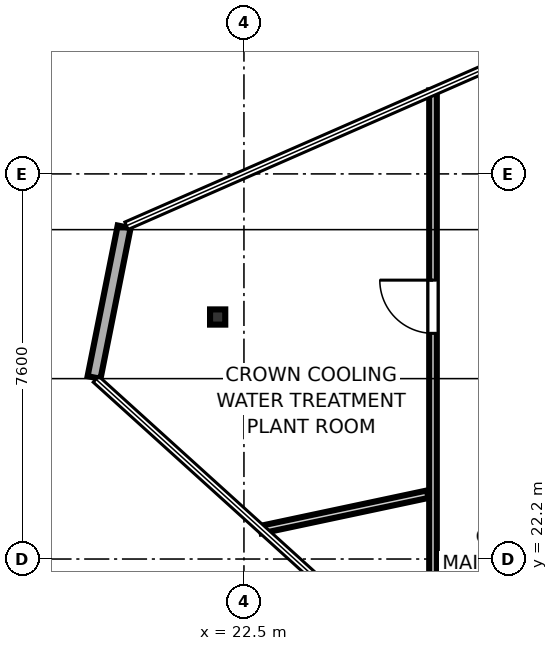
"""IFC4 building model, lengths in metres.
Left out: names, types, materials, properties, quantities, classifications, styles, units other than length and angle.
Written with IfcOpenShell. Run it as: python <this file> out.ifc"""

import sys

from ifc_helpers import new_model, si_unit, direction, frame, frame_2d, origin, origin_2d, place, context, subcontext, project, spatial, rectangle, i_section, extrude, element, fill, save


model = new_model("IFC4")
c1 = context("Model", 3, precision=1e-05, world=origin(), true_north=direction((0.0, 1.0)))
c2 = subcontext(c1, "Body", "Model", "MODEL_VIEW")
j1 = project(units=[si_unit("LENGTHUNIT", "METRE"), si_unit("PLANEANGLEUNIT", "RADIAN")], contexts=[c1])
p1 = place(None, origin())
s1 = spatial("IfcSite", under=j1, at=p1, CompositionType="ELEMENT")
p2 = place(p1, origin())
s2 = spatial("IfcBuilding", under=s1, at=p2, CompositionType="ELEMENT")
p3 = place(p2, frame((0.0, 0.0, 367.55)))
s3 = spatial("IfcBuildingStorey", under=s2, at=p3, CompositionType="ELEMENT", Elevation=367.55)
p4 = place(p3, frame((21.981, 26.976, 0.0), z_axis=(0.0, 0.0, 1.0), x_axis=(1.0, 0.0, 0.0)))
e1 = element("IfcColumn", 1, at=p4, inside=s3, PredefinedType="COLUMN", context=c2, shape_type="SweptSolid", body=[
    extrude(i_section(OverallWidth=0.3, OverallDepth=0.3, WebThickness=0.01, FlangeThickness=0.015, at=origin_2d()), origin(), (0.0, 0.0, 1.0), 3.75),
])
p5 = place(p3, frame((20.135, 28.756, 0.0), z_axis=(0.0, 0.0, 1.0), x_axis=(-0.1958064618, -0.980642559508, 0.0)))
e2 = element("IfcWall", 2, at=p5, inside=s3, PredefinedType="SOLIDWALL", context=c2, shape_type="SweptSolid", body=[
    extrude(rectangle(XDim=3.032, YDim=0.26, at=frame_2d((1.516, 0.0))), origin(), (0.0, 0.0, 1.0), 3.55),
])
p6 = place(p3, frame((26.231, 19.706, 0.0), z_axis=(0.0, 0.0, 1.0), x_axis=(0.0, 1.0, 0.0)))
e3 = element("IfcWall", 3, at=p6, inside=s3, PredefinedType="PARTITIONING", context=c2, shape_type="SweptSolid", body=[
    extrude(rectangle(XDim=11.742, YDim=0.15, at=frame_2d((5.871, 0.0))), origin(), (0.0, 0.0, 1.0), 2.87),
])
p7 = place(p6, frame((6.948, 0.0, 0.0)))
e4 = element("IfcOpeningElement", 4, at=p7, cuts=e3, PredefinedType="OPENING", context=c2, shape_type="SweptSolid", body=[
    extrude(rectangle(XDim=1.05, YDim=2.15, at=frame_2d((0.525, 1.075))), frame((0.0, 0.085, 0.0), z_axis=(0.0, -1.0, 0.0), x_axis=(1.0, 0.0, 0.0)), (0.0, 0.0, 1.0), 0.17),
])
p8 = place(p3, frame((22.834, 22.78, 0.0), z_axis=(0.0, 0.0, 1.0), x_axis=(0.978152398194, 0.20788911926, 0.0)))
e5 = element("IfcWall", 5, at=p8, inside=s3, PredefinedType="PARTITIONING", context=c2, shape_type="SweptSolid", body=[
    extrude(rectangle(XDim=3.366, YDim=0.15, at=frame_2d((1.683, 0.0))), origin(), (0.0, 0.0, 1.0), 2.87),
])
p9 = place(p7, origin())
e6 = element("IfcDoor", 6, at=p9, inside=s3, OperationType="SINGLE_SWING_RIGHT", PredefinedType="DOOR", context=c2, shape_type="SweptSolid", body=[
    extrude(rectangle(XDim=1.05, YDim=2.15, at=frame_2d((0.525, 1.075))), frame((0.0, 0.025, 0.0), z_axis=(0.0, -1.0, 0.0), x_axis=(1.0, 0.0, 0.0)), (0.0, 0.0, 1.0), 0.05),
])
fill(e4, e6)
save(model, sys.argv[1])
